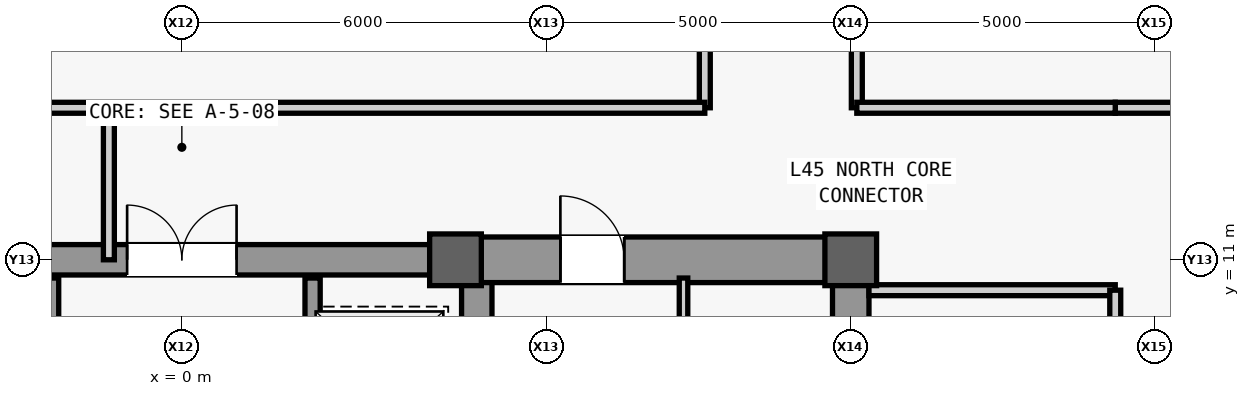
"""IFC4 building model, lengths in metres.
Left out: names, types, materials, properties, quantities, classifications, styles, units other than length and angle.
Written with IfcOpenShell. Run it as: python <this file> out.ifc"""

import sys

from ifc_helpers import new_model, si_unit, direction, frame, frame_2d, origin, origin_2d, place, context, subcontext, project, spatial, rectangle, extrude, source, transform, mapped, element, fill, save


model = new_model("IFC4")
c1 = context("Model", 3, precision=1e-05, world=origin(), true_north=direction((0.0, 1.0)))
c2 = subcontext(c1, "Body", "Model", "MODEL_VIEW")
j1 = project(units=[si_unit("LENGTHUNIT", "METRE"), si_unit("PLANEANGLEUNIT", "RADIAN")], contexts=[c1])
p1 = place(None, origin())
s1 = spatial("IfcSite", under=j1, at=p1, CompositionType="ELEMENT")
p2 = place(p1, origin())
s2 = spatial("IfcBuilding", under=s1, at=p2, CompositionType="ELEMENT")
p3 = place(p2, frame((0.0, 0.0, 195.1)))
s3 = spatial("IfcBuildingStorey", under=s2, at=p3, CompositionType="ELEMENT", Elevation=195.1)
m1 = source(origin(), c2, "Body", "SweptSolid", [
    extrude(rectangle(XDim=22.0, YDim=0.6, at=frame_2d((11.0, 0.0))), origin(), (0.0, 0.0, 1.0), 3.78),
])
p4 = place(p3, frame((11.0, -11.0, 0.0), z_axis=(0.0, 0.0, 1.0), x_axis=(0.0, 1.0, 0.0)))
e1 = element("IfcWall", 1, at=p4, inside=s3, PredefinedType="SHEAR", context=c2, shape_type="MappedRepresentation", body=[
    mapped(m1, transform((0.0, 0.0, 0.0), scale=1.0)),
])
m2 = source(origin(), c2, "Body", "SweptSolid", [
    extrude(rectangle(XDim=1.1, YDim=2.2, at=frame_2d((0.55, 1.1))), frame((0.0, 0.31, 0.0), z_axis=(0.0, -1.0, 0.0), x_axis=(1.0, 0.0, 0.0)), (0.0, 0.0, 1.0), 0.62),
])
p5 = place(p4, frame((0.8, 0.0, 0.0)))
e2 = element("IfcOpeningElement", 2, at=p5, cuts=e1, PredefinedType="OPENING", context=c2, shape_type="MappedRepresentation", body=[
    mapped(m2, transform((0.0, 0.0, 0.0), scale=1.0)),
])
m3 = source(origin(), c2, "Body", "SweptSolid", [
    extrude(rectangle(XDim=0.9, YDim=2.15, at=frame_2d((0.45, 1.075))), frame((0.0, 0.31, 0.0), z_axis=(0.0, -1.0, 0.0), x_axis=(1.0, 0.0, 0.0)), (0.0, 0.0, 1.0), 0.62),
])
p6 = place(p4, frame((6.2, 0.0, 0.0)))
e3 = element("IfcOpeningElement", 3, at=p6, cuts=e1, PredefinedType="OPENING", context=c2, shape_type="MappedRepresentation", body=[
    mapped(m3, transform((0.0, 0.0, 0.0), scale=1.0)),
])
p7 = place(p4, frame((8.525, 0.0, 0.0)))
e4 = element("IfcOpeningElement", 4, at=p7, cuts=e1, PredefinedType="OPENING", context=c2, shape_type="MappedRepresentation", body=[
    mapped(m3, transform((0.0, 0.0, 0.0), scale=1.0)),
])
m4 = source(origin(), c2, "Body", "SweptSolid", [
    extrude(rectangle(XDim=1.3, YDim=2.3, at=frame_2d((0.65, 1.15))), frame((0.0, 0.31, 0.0), z_axis=(0.0, -1.0, 0.0), x_axis=(1.0, 0.0, 0.0)), (0.0, 0.0, 1.0), 0.62),
])
p8 = place(p4, frame((2.7, 0.0, 0.0)))
e5 = element("IfcOpeningElement", 5, at=p8, cuts=e1, PredefinedType="OPENING", context=c2, shape_type="MappedRepresentation", body=[
    mapped(m4, transform((0.0, 0.0, 0.0), scale=1.0)),
])
p9 = place(p4, frame((13.35, 0.0, 0.0)))
e6 = element("IfcOpeningElement", 6, at=p9, cuts=e1, PredefinedType="OPENING", context=c2, shape_type="MappedRepresentation", body=[
    mapped(m4, transform((0.0, 0.0, 0.0), scale=1.0)),
])
m5 = source(origin(), c2, "Body", "SweptSolid", [
    extrude(rectangle(XDim=21.4, YDim=0.5, at=frame_2d((10.7, 0.0))), origin(), (0.0, 0.0, 1.0), 3.78),
])
p10 = place(p3, frame((4.85, -10.7, 0.0), z_axis=(0.0, 0.0, 1.0), x_axis=(0.0, 1.0, 0.0)))
e7 = element("IfcWall", 7, at=p10, inside=s3, PredefinedType="SHEAR", context=c2, shape_type="MappedRepresentation", body=[
    mapped(m5, transform((0.0, 0.0, 0.0), scale=1.0)),
])
m6 = source(origin(), c2, "Body", "SweptSolid", [
    extrude(rectangle(XDim=5.85, YDim=0.75, at=frame_2d((2.925, 0.0))), origin(), (0.0, 0.0, 1.0), 3.78),
])
p11 = place(p3, frame((4.85, 11.0, 0.0), z_axis=(0.0, 0.0, 1.0), x_axis=(1.0, 0.0, 0.0)))
e8 = element("IfcWall", 8, at=p11, inside=s3, PredefinedType="SHEAR", context=c2, shape_type="MappedRepresentation", body=[
    mapped(m6, transform((0.0, 0.0, 0.0), scale=1.0)),
])
m7 = source(origin(), c2, "Body", "SweptSolid", [
    extrude(rectangle(XDim=1.05, YDim=2.2, at=frame_2d((0.525, 1.1))), frame((0.0, 0.385, 0.0), z_axis=(0.0, -1.0, 0.0), x_axis=(1.0, 0.0, 0.0)), (0.0, 0.0, 1.0), 0.77),
])
p12 = place(p11, frame((1.375, 0.0, 0.0)))
e9 = element("IfcOpeningElement", 9, at=p12, cuts=e8, PredefinedType="OPENING", context=c2, shape_type="MappedRepresentation", body=[
    mapped(m7, transform((0.0, 0.0, 0.0), scale=1.0)),
])
m8 = source(origin(), c2, "Body", "SweptSolid", [
    extrude(rectangle(XDim=9.2, YDim=0.5, at=frame_2d((4.6, 0.0))), origin(), (0.0, 0.0, 1.0), 3.78),
])
p13 = place(p3, frame((-4.6, 11.0, 0.0), z_axis=(0.0, 0.0, 1.0), x_axis=(1.0, 0.0, 0.0)))
e10 = element("IfcWall", 10, at=p13, inside=s3, PredefinedType="SHEAR", context=c2, shape_type="MappedRepresentation", body=[
    mapped(m8, transform((0.0, 0.0, 0.0), scale=1.0)),
])
m9 = source(origin(), c2, "Body", "SweptSolid", [
    extrude(rectangle(XDim=1.8, YDim=2.25, at=frame_2d((0.9, 1.125))), frame((0.0, 0.26, 0.0), z_axis=(0.0, -1.0, 0.0), x_axis=(1.0, 0.0, 0.0)), (0.0, 0.0, 1.0), 0.52),
])
p14 = place(p13, frame((3.7, 0.0, 0.0)))
e11 = element("IfcOpeningElement", 11, at=p14, cuts=e10, PredefinedType="OPENING", context=c2, shape_type="MappedRepresentation", body=[
    mapped(m9, transform((0.0, 0.0, 0.0), scale=1.0)),
])
m10 = source(origin(), c2, "Body", "SweptSolid", [
    extrude(rectangle(XDim=0.85, YDim=0.85, at=origin_2d()), origin(), (0.0, 0.0, 1.0), 4.0),
])
for number, where, z_axis, x_axis in (
    (12, (4.5, 11.0, 0.0), (0.0, 0.0, 1.0), (1.0, 0.0, 0.0)),
    (13, (11.0, 11.0, 0.0), (0.0, 0.0, 1.0), (1.0, 0.0, 0.0)),
):
    element("IfcColumn", number, at=place(p3, frame(where, z_axis=z_axis, x_axis=x_axis)), inside=s3, PredefinedType="COLUMN", context=c2, shape_type="MappedRepresentation", body=[
        mapped(m10, transform((0.0, 0.0, 0.0), scale=1.0)),
    ])
m11 = source(origin(), c2, "Body", "SweptSolid", [
    extrude(rectangle(XDim=9.4, YDim=0.14, at=frame_2d((4.7, 0.0))), origin(), (0.0, 0.0, 1.0), 3.78),
])
p15 = place(p3, frame((8.25, 1.3, 0.0), z_axis=(0.0, 0.0, 1.0), x_axis=(0.0, 1.0, 0.0)))
e14 = element("IfcWall", 14, at=p15, inside=s3, PredefinedType="PARTITIONING", context=c2, shape_type="MappedRepresentation", body=[
    mapped(m11, transform((0.0, 0.0, 0.0), scale=1.0)),
])
m12 = source(origin(), c2, "Body", "SweptSolid", [
    extrude(rectangle(XDim=4.05, YDim=0.18, at=frame_2d((2.025, 0.0))), origin(), (0.0, 0.0, 1.0), 3.78),
])
p16 = place(p3, frame((11.3, 10.5, 0.0), z_axis=(0.0, 0.0, 1.0), x_axis=(1.0, 0.0, 0.0)))
e15 = element("IfcWall", 15, at=p16, inside=s3, PredefinedType="PARTITIONING", context=c2, shape_type="MappedRepresentation", body=[
    mapped(m12, transform((0.0, 0.0, 0.0), scale=1.0)),
])
m13 = source(origin(), c2, "Body", "SweptSolid", [
    extrude(rectangle(XDim=16.6, YDim=0.18, at=frame_2d((8.3, 0.0))), origin(), (0.0, 0.0, 1.0), 3.78),
])
p17 = place(p3, frame((15.35, -6.1, 0.0), z_axis=(0.0, 0.0, 1.0), x_axis=(0.0, 1.0, 0.0)))
e16 = element("IfcWall", 16, at=p17, inside=s3, PredefinedType="PARTITIONING", context=c2, shape_type="MappedRepresentation", body=[
    mapped(m13, transform((0.0, 0.0, 0.0), scale=1.0)),
])
m14 = source(origin(), c2, "Body", "SweptSolid", [
    extrude(rectangle(XDim=1.8, YDim=2.25, at=frame_2d((0.9, 1.125))), frame((0.0, 0.1, 0.0), z_axis=(0.0, -1.0, 0.0), x_axis=(1.0, 0.0, 0.0)), (0.0, 0.0, 1.0), 0.2),
])
p18 = place(p17, frame((2.7, 0.0, 0.0)))
e17 = element("IfcOpeningElement", 17, at=p18, cuts=e16, PredefinedType="OPENING", context=c2, shape_type="MappedRepresentation", body=[
    mapped(m14, transform((0.0, 0.0, 0.0), scale=1.0)),
])
p19 = place(p17, frame((13.0, 0.0, 0.0)))
e18 = element("IfcOpeningElement", 18, at=p19, cuts=e16, PredefinedType="OPENING", context=c2, shape_type="MappedRepresentation", body=[
    mapped(m14, transform((0.0, 0.0, 0.0), scale=1.0)),
])
m15 = source(origin(), c2, "Body", "SweptSolid", [
    extrude(rectangle(XDim=5.4, YDim=0.25, at=frame_2d((2.7, 0.0))), origin(), (0.0, 0.0, 1.0), 3.78),
])
p20 = place(p3, frame((-2.15, 5.3, 0.0), z_axis=(0.0, 0.0, 1.0), x_axis=(0.0, 1.0, 0.0)))
e19 = element("IfcWall", 19, at=p20, inside=s3, PredefinedType="SHEAR", context=c2, shape_type="MappedRepresentation", body=[
    mapped(m15, transform((0.0, 0.0, 0.0), scale=1.0)),
])
m16 = source(origin(), c2, "Body", "SweptSolid", [
    extrude(rectangle(XDim=1.2, YDim=2.3, at=frame_2d((0.6, 1.15))), frame((0.0, 0.135, 0.0), z_axis=(0.0, -1.0, 0.0), x_axis=(1.0, 0.0, 0.0)), (0.0, 0.0, 1.0), 0.27),
])
p21 = place(p20, frame((3.3, 0.0, 0.0)))
e20 = element("IfcOpeningElement", 20, at=p21, cuts=e19, PredefinedType="OPENING", context=c2, shape_type="MappedRepresentation", body=[
    mapped(m16, transform((0.0, 0.0, 0.0), scale=1.0)),
])
p22 = place(p20, frame((0.9, 0.0, 0.0)))
e21 = element("IfcOpeningElement", 21, at=p22, cuts=e19, PredefinedType="OPENING", context=c2, shape_type="MappedRepresentation", body=[
    mapped(m16, transform((0.0, 0.0, 0.0), scale=1.0)),
])
p23 = place(p3, frame((2.15, 5.3, 0.0), z_axis=(0.0, 0.0, 1.0), x_axis=(0.0, 1.0, 0.0)))
e22 = element("IfcWall", 22, at=p23, inside=s3, PredefinedType="SHEAR", context=c2, shape_type="MappedRepresentation", body=[
    mapped(m15, transform((0.0, 0.0, 0.0), scale=1.0)),
])
p24 = place(p23, frame((3.3, 0.0, 0.0)))
e23 = element("IfcOpeningElement", 23, at=p24, cuts=e22, PredefinedType="OPENING", context=c2, shape_type="MappedRepresentation", body=[
    mapped(m16, transform((0.0, 0.0, 0.0), scale=1.0)),
])
p25 = place(p23, frame((0.9, 0.0, 0.0)))
e24 = element("IfcOpeningElement", 24, at=p25, cuts=e22, PredefinedType="OPENING", context=c2, shape_type="MappedRepresentation", body=[
    mapped(m16, transform((0.0, 0.0, 0.0), scale=1.0)),
])
m17 = source(origin(), c2, "Body", "SweptSolid", [
    extrude(rectangle(XDim=2.45, YDim=0.18, at=frame_2d((1.225, 0.0))), origin(), (0.0, 0.0, 1.0), 3.78),
])
p26 = place(p3, frame((15.35, 13.5, 0.0), z_axis=(0.0, 0.0, 1.0), x_axis=(1.0, 0.0, 0.0)))
e25 = element("IfcWall", 25, at=p26, inside=s3, PredefinedType="PARTITIONING", context=c2, shape_type="MappedRepresentation", body=[
    mapped(m17, transform((0.0, 0.0, 0.0), scale=1.0)),
])
m18 = source(origin(), c2, "Body", "SweptSolid", [
    extrude(rectangle(XDim=2.5, YDim=0.18, at=frame_2d((1.25, 0.0))), origin(), (0.0, 0.0, 1.0), 3.78),
])
p27 = place(p3, frame((-1.2, 11.0, 0.0), z_axis=(0.0, 0.0, 1.0), x_axis=(0.0, 1.0, 0.0)))
e26 = element("IfcWall", 26, at=p27, inside=s3, PredefinedType="PARTITIONING", context=c2, shape_type="MappedRepresentation", body=[
    mapped(m18, transform((0.0, 0.0, 0.0), scale=1.0)),
])
m19 = source(origin(), c2, "Body", "SweptSolid", [
    extrude(rectangle(XDim=16.5, YDim=0.18, at=frame_2d((8.25, 0.0))), origin(), (0.0, 0.0, 1.0), 3.78),
])
p28 = place(p3, frame((8.6, 13.5, 0.0), z_axis=(0.0, 0.0, 1.0), x_axis=(0.0, 1.0, 0.0)))
e27 = element("IfcWall", 27, at=p28, inside=s3, PredefinedType="PARTITIONING", context=c2, shape_type="MappedRepresentation", body=[
    mapped(m19, transform((0.0, 0.0, 0.0), scale=1.0)),
])
m20 = source(origin(), c2, "Body", "SweptSolid", [
    extrude(rectangle(XDim=1.05, YDim=2.2, at=frame_2d((0.525, 1.1))), frame((0.0, 0.1, 0.0), z_axis=(0.0, -1.0, 0.0), x_axis=(1.0, 0.0, 0.0)), (0.0, 0.0, 1.0), 0.2),
])
p29 = place(p28, frame((11.85, 0.0, 0.0)))
e28 = element("IfcOpeningElement", 28, at=p29, cuts=e27, PredefinedType="OPENING", context=c2, shape_type="MappedRepresentation", body=[
    mapped(m20, transform((0.0, 0.0, 0.0), scale=1.0)),
])
m21 = source(origin(), c2, "Body", "SweptSolid", [
    extrude(rectangle(XDim=23.95, YDim=0.18, at=frame_2d((11.975, 0.0))), origin(), (0.0, 0.0, 1.0), 3.78),
])
p30 = place(p3, frame((-15.35, 13.5, 0.0), z_axis=(0.0, 0.0, 1.0), x_axis=(1.0, 0.0, 0.0)))
e29 = element("IfcWall", 29, at=p30, inside=s3, PredefinedType="PARTITIONING", context=c2, shape_type="MappedRepresentation", body=[
    mapped(m21, transform((0.0, 0.0, 0.0), scale=1.0)),
])
m22 = source(origin(), c2, "Body", "SweptSolid", [
    extrude(rectangle(XDim=16.5, YDim=0.18, at=frame_2d((8.25, 0.0))), origin(), (0.0, 0.0, 1.0), 3.007),
])
p31 = place(p3, frame((11.1, 13.5, 0.0), z_axis=(0.0, 0.0, 1.0), x_axis=(0.0, 1.0, 0.0)))
e30 = element("IfcWall", 30, at=p31, inside=s3, PredefinedType="PARTITIONING", context=c2, shape_type="MappedRepresentation", body=[
    mapped(m22, transform((0.0, 0.0, 0.0), scale=1.0)),
])
p32 = place(p31, frame((11.85, 0.0, 0.0)))
e31 = element("IfcOpeningElement", 31, at=p32, cuts=e30, PredefinedType="OPENING", context=c2, shape_type="MappedRepresentation", body=[
    mapped(m20, transform((0.0, 0.0, 0.0), scale=1.0)),
])
m23 = source(origin(), c2, "Body", "SweptSolid", [
    extrude(rectangle(XDim=4.25, YDim=0.18, at=frame_2d((2.125, 0.0))), origin(), (0.0, 0.0, 1.0), 3.78),
])
p33 = place(p3, frame((11.1, 13.5, 0.0), z_axis=(0.0, 0.0, 1.0), x_axis=(1.0, 0.0, 0.0)))
e32 = element("IfcWall", 32, at=p33, inside=s3, PredefinedType="PARTITIONING", context=c2, shape_type="MappedRepresentation", body=[
    mapped(m23, transform((0.0, 0.0, 0.0), scale=1.0)),
])
m24 = source(origin(), c2, "Body", "SweptSolid", [
    extrude(rectangle(XDim=1.05, YDim=2.2, at=frame_2d((0.525, 1.1))), frame((0.0, 0.025, 0.0), z_axis=(0.0, -1.0, 0.0), x_axis=(1.0, 0.0, 0.0)), (0.0, 0.0, 1.0), 0.05),
])
p34 = place(p12, origin())
e33 = element("IfcDoor", 33, at=p34, inside=s3, OperationType="SINGLE_SWING_LEFT", PredefinedType="DOOR", context=c2, shape_type="MappedRepresentation", body=[
    mapped(m24, transform((0.0, 0.0, 0.0), scale=1.0)),
])
fill(e9, e33)
m25 = source(origin(), c2, "Body", "SweptSolid", [
    extrude(rectangle(XDim=1.8, YDim=2.25, at=frame_2d((0.9, 1.125))), frame((0.0, 0.025, 0.0), z_axis=(0.0, -1.0, 0.0), x_axis=(1.0, 0.0, 0.0)), (0.0, 0.0, 1.0), 0.05),
])
p35 = place(p14, origin())
e34 = element("IfcDoor", 34, at=p35, inside=s3, OperationType="SINGLE_SWING_RIGHT", PredefinedType="DOOR", context=c2, shape_type="MappedRepresentation", body=[
    mapped(m25, transform((0.0, 0.0, 0.0), scale=1.0)),
])
fill(e11, e34)
save(model, sys.argv[1])
